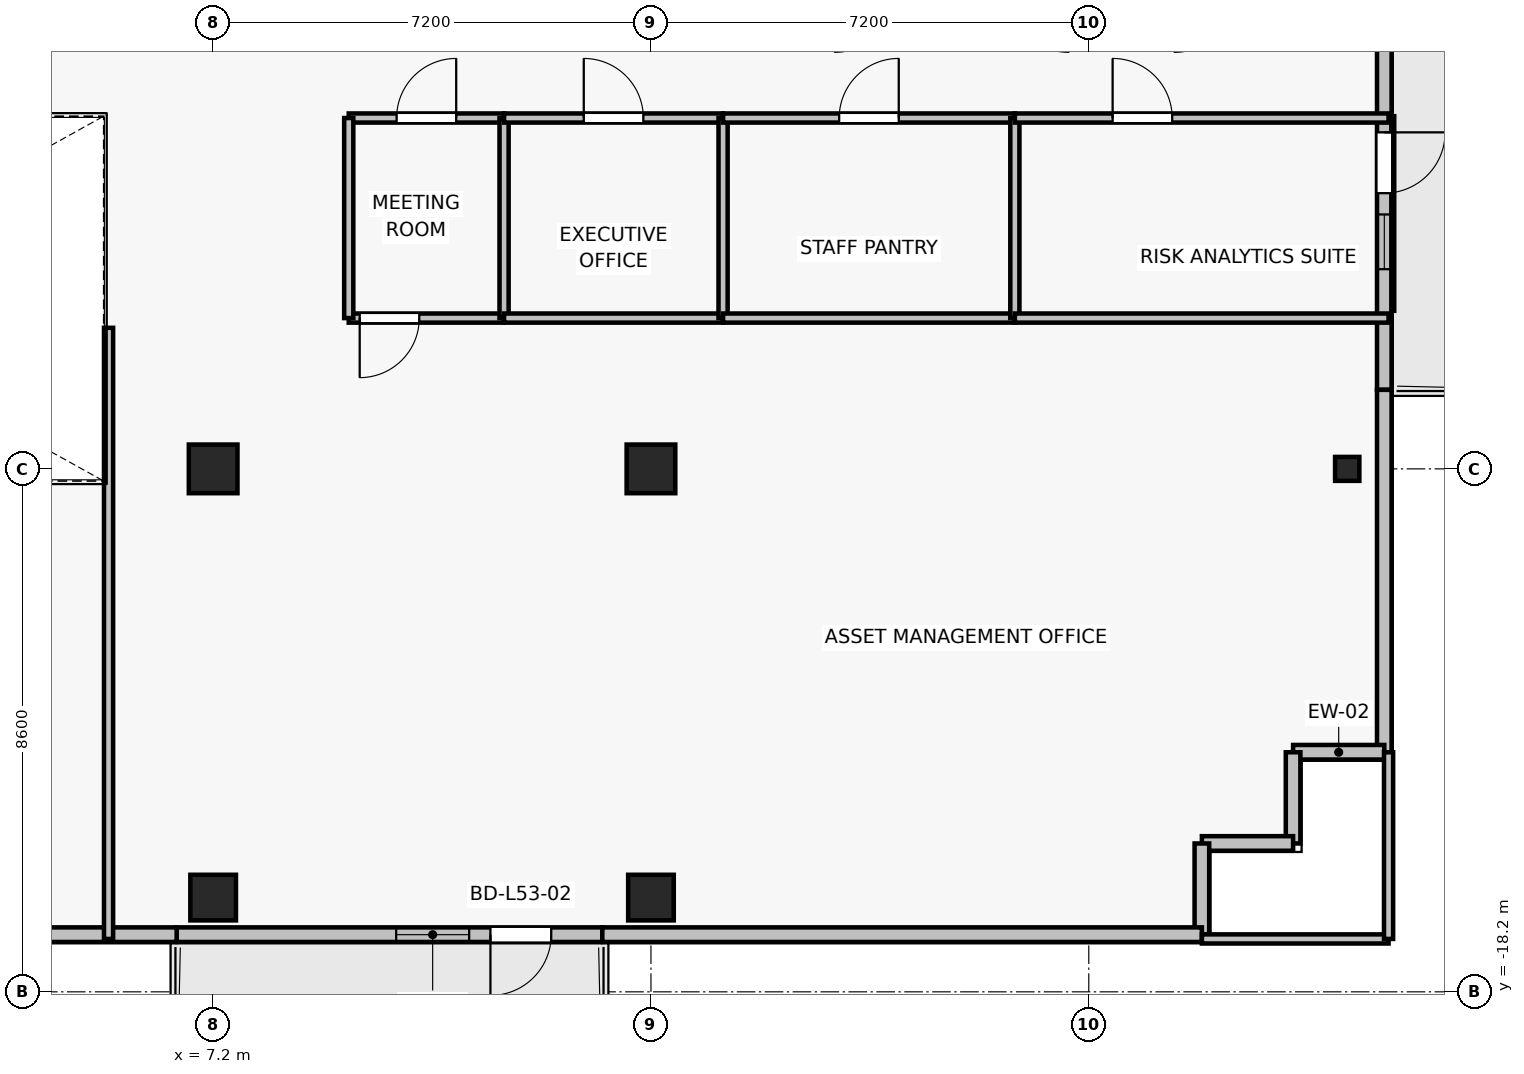
"""IFC4 building model, lengths in metres.
Left out: names, types, materials, properties, quantities, classifications, styles, units other than length and angle.
Written with IfcOpenShell. Run it as: python <this file> out.ifc"""

import sys

from ifc_helpers import new_model, si_unit, direction, frame, frame_2d, origin, origin_2d, place, context, subcontext, project, spatial, rectangle, i_section, extrude, source, transform, mapped, element, fill, save


model = new_model("IFC4")
c1 = context("Model", 3, precision=1e-05, world=origin(), true_north=direction((0.0, 1.0)))
c2 = subcontext(c1, "Body", "Model", "MODEL_VIEW")
j1 = project(units=[si_unit("LENGTHUNIT", "METRE"), si_unit("PLANEANGLEUNIT", "RADIAN")], contexts=[c1])
p1 = place(None, origin())
s1 = spatial("IfcSite", under=j1, at=p1, CompositionType="ELEMENT")
p2 = place(p1, origin())
s2 = spatial("IfcBuilding", under=s1, at=p2, CompositionType="ELEMENT")
p3 = place(p2, frame((0.0, 0.0, 189.1)))
s3 = spatial("IfcBuildingStorey", under=s2, at=p3, CompositionType="ELEMENT", Elevation=189.1)
for number, where, z_axis, x_axis in (
    (1, (7.2, -9.6, 0.0), (0.0, 0.0, 1.0), (1.0, 0.0, 0.0)),
    (2, (14.4, -9.6, 0.0), (0.0, 0.0, 1.0), (1.0, 0.0, 0.0)),
):
    element("IfcColumn", number, at=place(p3, frame(where, z_axis=z_axis, x_axis=x_axis)), inside=s3, PredefinedType="COLUMN", context=c2, shape_type="SweptSolid", body=[
        extrude(rectangle(XDim=0.8, YDim=0.8, at=origin_2d()), origin(), (0.0, 0.0, 1.0), 3.3),
    ])
for number, where, z_axis, x_axis in (
    (3, (7.2, -16.65, 0.0), (0.0, 0.0, 1.0), (1.0, 0.0, 0.0)),
    (4, (14.4, -16.65, 0.0), (0.0, 0.0, 1.0), (1.0, 0.0, 0.0)),
):
    element("IfcColumn", number, at=place(p3, frame(where, z_axis=z_axis, x_axis=x_axis)), inside=s3, PredefinedType="COLUMN", context=c2, shape_type="SweptSolid", body=[
        extrude(rectangle(XDim=0.75, YDim=0.75, at=origin_2d()), origin(), (0.0, 0.0, 1.0), 3.3),
    ])
p4 = place(p3, frame((25.85, -9.6, 0.0), z_axis=(0.0, 0.0, 1.0), x_axis=(1.0, 0.0, 0.0)))
e5 = element("IfcColumn", 5, at=p4, inside=s3, PredefinedType="COLUMN", context=c2, shape_type="SweptSolid", body=[
    extrude(i_section(OverallWidth=0.399, OverallDepth=0.394, WebThickness=0.023, FlangeThickness=0.037, FilletRadius=0.015, at=origin_2d()), origin(), (0.0, 0.0, 1.0), 3.3),
])
p5 = place(p3, frame((13.6, -17.26, 0.0), z_axis=(0.0, 0.0, 1.0), x_axis=(-1.0, 0.0, 0.0)))
e6 = element("IfcWall", 6, at=p5, inside=s3, PredefinedType="SOLIDWALL", context=c2, shape_type="SweptSolid", body=[
    extrude(rectangle(XDim=7.0, YDim=0.24, at=frame_2d((3.5, 0.0))), origin(), (0.0, 0.0, 1.0), 2.665),
])
p6 = place(p5, frame((0.84, 0.0, 0.0)))
e7 = element("IfcOpeningElement", 7, at=p6, cuts=e6, PredefinedType="OPENING", context=c2, shape_type="SweptSolid", body=[
    extrude(rectangle(XDim=1.0, YDim=2.2, at=frame_2d((0.5, 1.1))), frame((0.0, 0.13, 0.0), z_axis=(0.0, -1.0, 0.0), x_axis=(1.0, 0.0, 0.0)), (0.0, 0.0, 1.0), 0.26),
])
p7 = place(p5, frame((2.19, 0.0, 0.85)))
e8 = element("IfcOpeningElement", 8, at=p7, cuts=e6, PredefinedType="OPENING", context=c2, shape_type="SweptSolid", body=[
    extrude(rectangle(XDim=1.2, YDim=1.5, at=frame_2d((0.6, 0.75))), frame((0.0, 0.13, 0.0), z_axis=(0.0, -1.0, 0.0), x_axis=(1.0, 0.0, 0.0)), (0.0, 0.0, 1.0), 0.26),
])
p8 = place(p3, frame((26.46, -2.5, 0.0), z_axis=(0.0, 0.0, 1.0), x_axis=(0.0, -1.0, 0.0)))
e9 = element("IfcWall", 9, at=p8, inside=s3, PredefinedType="SOLIDWALL", context=c2, shape_type="SweptSolid", body=[
    extrude(rectangle(XDim=5.8, YDim=0.24, at=frame_2d((2.9, 0.0))), origin(), (0.0, 0.0, 1.0), 3.075),
])
p9 = place(p8, frame((1.566, 0.0, 0.0)))
e10 = element("IfcOpeningElement", 10, at=p9, cuts=e9, PredefinedType="OPENING", context=c2, shape_type="SweptSolid", body=[
    extrude(rectangle(XDim=1.0, YDim=2.2, at=frame_2d((0.5, 1.1))), frame((0.0, 0.13, 0.0), z_axis=(0.0, -1.0, 0.0), x_axis=(1.0, 0.0, 0.0)), (0.0, 0.0, 1.0), 0.26),
])
p10 = place(p8, frame((2.916, 0.0, 0.85)))
e11 = element("IfcOpeningElement", 11, at=p10, cuts=e9, PredefinedType="OPENING", context=c2, shape_type="SweptSolid", body=[
    extrude(rectangle(XDim=0.9, YDim=1.35, at=frame_2d((0.45, 0.675))), frame((0.0, 0.13, 0.0), z_axis=(0.0, -1.0, 0.0), x_axis=(1.0, 0.0, 0.0)), (0.0, 0.0, 1.0), 0.26),
])
p11 = place(p3, frame((26.46, -14.26, 0.0), z_axis=(0.0, 0.0, 1.0), x_axis=(0.0, 1.0, 0.0)))
e12 = element("IfcWall", 12, at=p11, inside=s3, PredefinedType="SOLIDWALL", context=c2, shape_type="SweptSolid", body=[
    extrude(rectangle(XDim=5.96, YDim=0.24, at=frame_2d((2.98, 0.0))), origin(), (0.0, 0.0, 1.0), 3.075),
])
for number, where, z_axis, x_axis in (
    (13, (24.96, -14.26, 0.0), (0.0, 0.0, 1.0), (1.0, 0.0, 0.0)),
    (14, (24.96, -15.76, 0.0), (0.0, 0.0, 1.0), (0.0, 1.0, 0.0)),
    (15, (23.46, -15.76, 0.0), (0.0, 0.0, 1.0), (1.0, 0.0, 0.0)),
    (16, (23.46, -17.26, 0.0), (0.0, 0.0, 1.0), (0.0, 1.0, 0.0)),
):
    element("IfcWall", number, at=place(p3, frame(where, z_axis=z_axis, x_axis=x_axis)), inside=s3, PredefinedType="SOLIDWALL", context=c2, shape_type="SweptSolid", body=[
        extrude(rectangle(XDim=1.5, YDim=0.24, at=frame_2d((0.75, 0.0))), origin(), (0.0, 0.0, 1.0), 3.075),
    ])
p12 = place(p3, frame((13.6, -17.26, 0.0), z_axis=(0.0, 0.0, 1.0), x_axis=(1.0, 0.0, 0.0)))
e17 = element("IfcWall", 17, at=p12, inside=s3, PredefinedType="SOLIDWALL", context=c2, shape_type="SweptSolid", body=[
    extrude(rectangle(XDim=9.86, YDim=0.24, at=frame_2d((4.93, 0.0))), origin(), (0.0, 0.0, 1.0), 2.665),
])
p13 = place(p3, frame((3.2, -17.26, 0.0), z_axis=(0.0, 0.0, 1.0), x_axis=(1.0, 0.0, 0.0)))
e18 = element("IfcWall", 18, at=p13, inside=s3, PredefinedType="SOLIDWALL", context=c2, shape_type="SweptSolid", body=[
    extrude(rectangle(XDim=3.4, YDim=0.24, at=frame_2d((1.7, 0.0))), origin(), (0.0, 0.0, 1.0), 3.075),
])
p14 = place(p3, frame((11.984, -7.12, 0.0), z_axis=(0.0, 0.0, 1.0), x_axis=(-1.0, 0.0, 0.0)))
e19 = element("IfcWall", 19, at=p14, inside=s3, PredefinedType="PARTITIONING", context=c2, shape_type="SweptSolid", body=[
    extrude(rectangle(XDim=2.554, YDim=0.15, at=frame_2d((1.277, 0.0))), origin(), (0.0, 0.0, 1.0), 3.075),
])
p15 = place(p14, frame((1.394, 0.0, 0.0)))
e20 = element("IfcOpeningElement", 20, at=p15, cuts=e19, PredefinedType="OPENING", context=c2, shape_type="SweptSolid", body=[
    extrude(rectangle(XDim=0.98, YDim=2.15, at=frame_2d((0.49, 1.075))), frame((0.0, 0.085, 0.0), z_axis=(0.0, -1.0, 0.0), x_axis=(1.0, 0.0, 0.0)), (0.0, 0.0, 1.0), 0.17),
])
p16 = place(p3, frame((9.43, -3.83, 0.0), z_axis=(0.0, 0.0, 1.0), x_axis=(1.0, 0.0, 0.0)))
e21 = element("IfcWall", 21, at=p16, inside=s3, PredefinedType="PARTITIONING", context=c2, shape_type="SweptSolid", body=[
    extrude(rectangle(XDim=2.554, YDim=0.15, at=frame_2d((1.277, 0.0))), origin(), (0.0, 0.0, 1.0), 3.075),
])
p17 = place(p16, frame((0.787, 0.0, 0.0)))
e22 = element("IfcOpeningElement", 22, at=p17, cuts=e21, PredefinedType="OPENING", context=c2, shape_type="SweptSolid", body=[
    extrude(rectangle(XDim=0.98, YDim=2.15, at=frame_2d((0.49, 1.075))), frame((0.0, 0.085, 0.0), z_axis=(0.0, -1.0, 0.0), x_axis=(1.0, 0.0, 0.0)), (0.0, 0.0, 1.0), 0.17),
])
for number, where, z_axis, x_axis in (
    (23, (9.43, -7.12, 0.0), (0.0, 0.0, 1.0), (0.0, 1.0, 0.0)),
    (24, (11.984, -3.83, 0.0), (0.0, 0.0, 1.0), (0.0, -1.0, 0.0)),
):
    element("IfcWall", number, at=place(p3, frame(where, z_axis=z_axis, x_axis=x_axis)), inside=s3, PredefinedType="PARTITIONING", context=c2, shape_type="SweptSolid", body=[
        extrude(rectangle(XDim=3.29, YDim=0.15, at=frame_2d((1.645, 0.0))), origin(), (0.0, 0.0, 1.0), 2.665),
    ])
p18 = place(p3, frame((15.586, -7.12, 0.0), z_axis=(0.0, 0.0, 1.0), x_axis=(-1.0, 0.0, 0.0)))
e25 = element("IfcWall", 25, at=p18, inside=s3, PredefinedType="PARTITIONING", context=c2, shape_type="SweptSolid", body=[
    extrude(rectangle(XDim=3.602, YDim=0.15, at=frame_2d((1.801, 0.0))), origin(), (0.0, 0.0, 1.0), 2.565),
])
p19 = place(p3, frame((11.984, -3.83, 0.0), z_axis=(0.0, 0.0, 1.0), x_axis=(1.0, 0.0, 0.0)))
e26 = element("IfcWall", 26, at=p19, inside=s3, PredefinedType="PARTITIONING", context=c2, shape_type="SweptSolid", body=[
    extrude(rectangle(XDim=3.602, YDim=0.15, at=frame_2d((1.801, 0.0))), origin(), (0.0, 0.0, 1.0), 2.565),
])
p20 = place(p19, frame((1.311, 0.0, 0.0)))
e27 = element("IfcOpeningElement", 27, at=p20, cuts=e26, PredefinedType="OPENING", context=c2, shape_type="SweptSolid", body=[
    extrude(rectangle(XDim=0.98, YDim=2.15, at=frame_2d((0.49, 1.075))), frame((0.0, 0.085, 0.0), z_axis=(0.0, -1.0, 0.0), x_axis=(1.0, 0.0, 0.0)), (0.0, 0.0, 1.0), 0.17),
])
p21 = place(p3, frame((15.586, -3.83, 0.0), z_axis=(0.0, 0.0, 1.0), x_axis=(0.0, -1.0, 0.0)))
e28 = element("IfcWall", 28, at=p21, inside=s3, PredefinedType="PARTITIONING", context=c2, shape_type="SweptSolid", body=[
    extrude(rectangle(XDim=3.29, YDim=0.15, at=frame_2d((1.645, 0.0))), origin(), (0.0, 0.0, 1.0), 3.075),
])
p22 = place(p3, frame((20.385, -7.12, 0.0), z_axis=(0.0, 0.0, 1.0), x_axis=(-1.0, 0.0, 0.0)))
e29 = element("IfcWall", 29, at=p22, inside=s3, PredefinedType="PARTITIONING", context=c2, shape_type="SweptSolid", body=[
    extrude(rectangle(XDim=4.799, YDim=0.15, at=frame_2d((2.399, 0.0))), origin(), (0.0, 0.0, 1.0), 3.075),
])
p23 = place(p3, frame((15.586, -3.83, 0.0), z_axis=(0.0, 0.0, 1.0), x_axis=(1.0, 0.0, 0.0)))
e30 = element("IfcWall", 30, at=p23, inside=s3, PredefinedType="PARTITIONING", context=c2, shape_type="SweptSolid", body=[
    extrude(rectangle(XDim=4.799, YDim=0.15, at=frame_2d((2.399, 0.0))), origin(), (0.0, 0.0, 1.0), 3.075),
])
p24 = place(p23, frame((1.909, 0.0, 0.0)))
e31 = element("IfcOpeningElement", 31, at=p24, cuts=e30, PredefinedType="OPENING", context=c2, shape_type="SweptSolid", body=[
    extrude(rectangle(XDim=0.98, YDim=2.15, at=frame_2d((0.49, 1.075))), frame((0.0, 0.085, 0.0), z_axis=(0.0, -1.0, 0.0), x_axis=(1.0, 0.0, 0.0)), (0.0, 0.0, 1.0), 0.17),
])
p25 = place(p3, frame((20.385, -3.83, 0.0), z_axis=(0.0, 0.0, 1.0), x_axis=(0.0, -1.0, 0.0)))
e32 = element("IfcWall", 32, at=p25, inside=s3, PredefinedType="PARTITIONING", context=c2, shape_type="SweptSolid", body=[
    extrude(rectangle(XDim=3.29, YDim=0.15, at=frame_2d((1.645, 0.0))), origin(), (0.0, 0.0, 1.0), 3.075),
])
p26 = place(p3, frame((26.53, -7.12, 0.0), z_axis=(0.0, 0.0, 1.0), x_axis=(-1.0, 0.0, 0.0)))
e33 = element("IfcWall", 33, at=p26, inside=s3, PredefinedType="PARTITIONING", context=c2, shape_type="SweptSolid", body=[
    extrude(rectangle(XDim=6.146, YDim=0.15, at=frame_2d((3.073, 0.0))), origin(), (0.0, 0.0, 1.0), 2.565),
])
p27 = place(p3, frame((20.385, -3.83, 0.0), z_axis=(0.0, 0.0, 1.0), x_axis=(1.0, 0.0, 0.0)))
e34 = element("IfcWall", 34, at=p27, inside=s3, PredefinedType="PARTITIONING", context=c2, shape_type="SweptSolid", body=[
    extrude(rectangle(XDim=6.146, YDim=0.15, at=frame_2d((3.073, 0.0))), origin(), (0.0, 0.0, 1.0), 2.565),
])
p28 = place(p27, frame((1.607, 0.0, 0.0)))
e35 = element("IfcOpeningElement", 35, at=p28, cuts=e34, PredefinedType="OPENING", context=c2, shape_type="SweptSolid", body=[
    extrude(rectangle(XDim=0.98, YDim=2.15, at=frame_2d((0.49, 1.075))), frame((0.0, 0.085, 0.0), z_axis=(0.0, -1.0, 0.0), x_axis=(1.0, 0.0, 0.0)), (0.0, 0.0, 1.0), 0.17),
])
p29 = place(p3, frame((26.53, -17.33, 0.0), z_axis=(0.0, 0.0, 1.0), x_axis=(-1.0, 0.0, 0.0)))
e36 = element("IfcWall", 36, at=p29, inside=s3, PredefinedType="PARTITIONING", context=c2, shape_type="SweptSolid", body=[
    extrude(rectangle(XDim=3.07, YDim=0.15, at=frame_2d((1.535, 0.0))), origin(), (0.0, 0.0, 1.0), 2.665),
])
p30 = place(p3, frame((5.48, -17.33, 0.0), z_axis=(0.0, 0.0, 1.0), x_axis=(0.0, 1.0, 0.0)))
e37 = element("IfcWall", 37, at=p30, inside=s3, PredefinedType="PARTITIONING", context=c2, shape_type="SweptSolid", body=[
    extrude(rectangle(XDim=10.05, YDim=0.15, at=frame_2d((5.025, 0.0))), origin(), (0.0, 0.0, 1.0), 2.565),
])
p31 = place(p3, frame((26.53, -14.26, 0.0), z_axis=(0.0, 0.0, 1.0), x_axis=(0.0, -1.0, 0.0)))
e38 = element("IfcWall", 38, at=p31, inside=s3, PredefinedType="PARTITIONING", context=c2, shape_type="SweptSolid", body=[
    extrude(rectangle(XDim=3.07, YDim=0.15, at=frame_2d((1.535, 0.0))), origin(), (0.0, 0.0, 1.0), 3.075),
])
m1 = source(origin(), c2, "Body", "SweptSolid", [
    extrude(rectangle(XDim=1.0, YDim=2.2, at=frame_2d((0.5, 1.1))), frame((0.0, 0.025, 0.0), z_axis=(0.0, -1.0, 0.0), x_axis=(1.0, 0.0, 0.0)), (0.0, 0.0, 1.0), 0.05),
])
p32 = place(p6, origin())
e39 = element("IfcDoor", 39, at=p32, inside=s3, OperationType="SINGLE_SWING_RIGHT", PredefinedType="DOOR", context=c2, shape_type="MappedRepresentation", body=[
    mapped(m1, transform((0.0, 0.0, 0.0), x_axis=(1.0, 0.0, 0.0), y_axis=(0.0, 1.0, 0.0), z_axis=(0.0, 0.0, 1.0), scale=1.0)),
])
fill(e7, e39)
m2 = source(origin(), c2, "Body", "SweptSolid", [
    extrude(rectangle(XDim=1.2, YDim=1.5, at=frame_2d((0.6, 0.75))), frame((0.0, 0.03, 0.0), z_axis=(0.0, -1.0, 0.0), x_axis=(1.0, 0.0, 0.0)), (0.0, 0.0, 1.0), 0.06),
])
p33 = place(p7, origin())
e40 = element("IfcWindow", 40, at=p33, inside=s3, PartitioningType="SINGLE_PANEL", PredefinedType="WINDOW", context=c2, shape_type="MappedRepresentation", body=[
    mapped(m2, transform((0.0, 0.0, 0.0), x_axis=(1.0, 0.0, 0.0), y_axis=(0.0, 1.0, 0.0), z_axis=(0.0, 0.0, 1.0), scale=1.0)),
])
fill(e8, e40)
p34 = place(p9, origin())
e41 = element("IfcDoor", 41, at=p34, inside=s3, OperationType="SINGLE_SWING_LEFT", PredefinedType="DOOR", context=c2, shape_type="MappedRepresentation", body=[
    mapped(m1, transform((0.0, 0.0, 0.0), x_axis=(1.0, 0.0, 0.0), y_axis=(0.0, 1.0, 0.0), z_axis=(0.0, 0.0, 1.0), scale=1.0)),
])
fill(e10, e41)
m3 = source(origin(), c2, "Body", "SweptSolid", [
    extrude(rectangle(XDim=0.9, YDim=1.35, at=frame_2d((0.45, 0.675))), frame((0.0, 0.03, 0.0), z_axis=(0.0, -1.0, 0.0), x_axis=(1.0, 0.0, 0.0)), (0.0, 0.0, 1.0), 0.06),
])
p35 = place(p10, origin())
e42 = element("IfcWindow", 42, at=p35, inside=s3, PartitioningType="SINGLE_PANEL", PredefinedType="WINDOW", context=c2, shape_type="MappedRepresentation", body=[
    mapped(m3, transform((0.0, 0.0, 0.0), x_axis=(1.0, 0.0, 0.0), y_axis=(0.0, 1.0, 0.0), z_axis=(0.0, 0.0, 1.0), scale=1.0)),
])
fill(e11, e42)
m4 = source(origin(), c2, "Body", "SweptSolid", [
    extrude(rectangle(XDim=0.98, YDim=2.15, at=frame_2d((0.49, 1.075))), frame((0.0, 0.025, 0.0), z_axis=(0.0, -1.0, 0.0), x_axis=(1.0, 0.0, 0.0)), (0.0, 0.0, 1.0), 0.05),
])
p36 = place(p17, origin())
e43 = element("IfcDoor", 43, at=p36, inside=s3, OperationType="SINGLE_SWING_RIGHT", PredefinedType="DOOR", context=c2, shape_type="MappedRepresentation", body=[
    mapped(m4, transform((0.0, 0.0, 0.0), x_axis=(1.0, 0.0, 0.0), y_axis=(0.0, 1.0, 0.0), z_axis=(0.0, 0.0, 1.0), scale=1.0)),
])
fill(e22, e43)
p37 = place(p20, origin())
e44 = element("IfcDoor", 44, at=p37, inside=s3, OperationType="SINGLE_SWING_LEFT", PredefinedType="DOOR", context=c2, shape_type="MappedRepresentation", body=[
    mapped(m4, transform((0.0, 0.0, 0.0), x_axis=(1.0, 0.0, 0.0), y_axis=(0.0, 1.0, 0.0), z_axis=(0.0, 0.0, 1.0), scale=1.0)),
])
fill(e27, e44)
p38 = place(p24, origin())
e45 = element("IfcDoor", 45, at=p38, inside=s3, OperationType="SINGLE_SWING_RIGHT", PredefinedType="DOOR", context=c2, shape_type="MappedRepresentation", body=[
    mapped(m4, transform((0.0, 0.0, 0.0), x_axis=(1.0, 0.0, 0.0), y_axis=(0.0, 1.0, 0.0), z_axis=(0.0, 0.0, 1.0), scale=1.0)),
])
fill(e31, e45)
p39 = place(p28, origin())
e46 = element("IfcDoor", 46, at=p39, inside=s3, OperationType="SINGLE_SWING_LEFT", PredefinedType="DOOR", context=c2, shape_type="MappedRepresentation", body=[
    mapped(m4, transform((0.0, 0.0, 0.0), x_axis=(1.0, 0.0, 0.0), y_axis=(0.0, 1.0, 0.0), z_axis=(0.0, 0.0, 1.0), scale=1.0)),
])
fill(e35, e46)
p40 = place(p15, origin())
e47 = element("IfcDoor", 47, at=p40, inside=s3, OperationType="SINGLE_SWING_RIGHT", PredefinedType="DOOR", context=c2, shape_type="MappedRepresentation", body=[
    mapped(m4, transform((0.0, 0.0, 0.0), x_axis=(1.0, 0.0, 0.0), y_axis=(0.0, 1.0, 0.0), z_axis=(0.0, 0.0, 1.0), scale=1.0)),
])
fill(e20, e47)
save(model, sys.argv[1])
